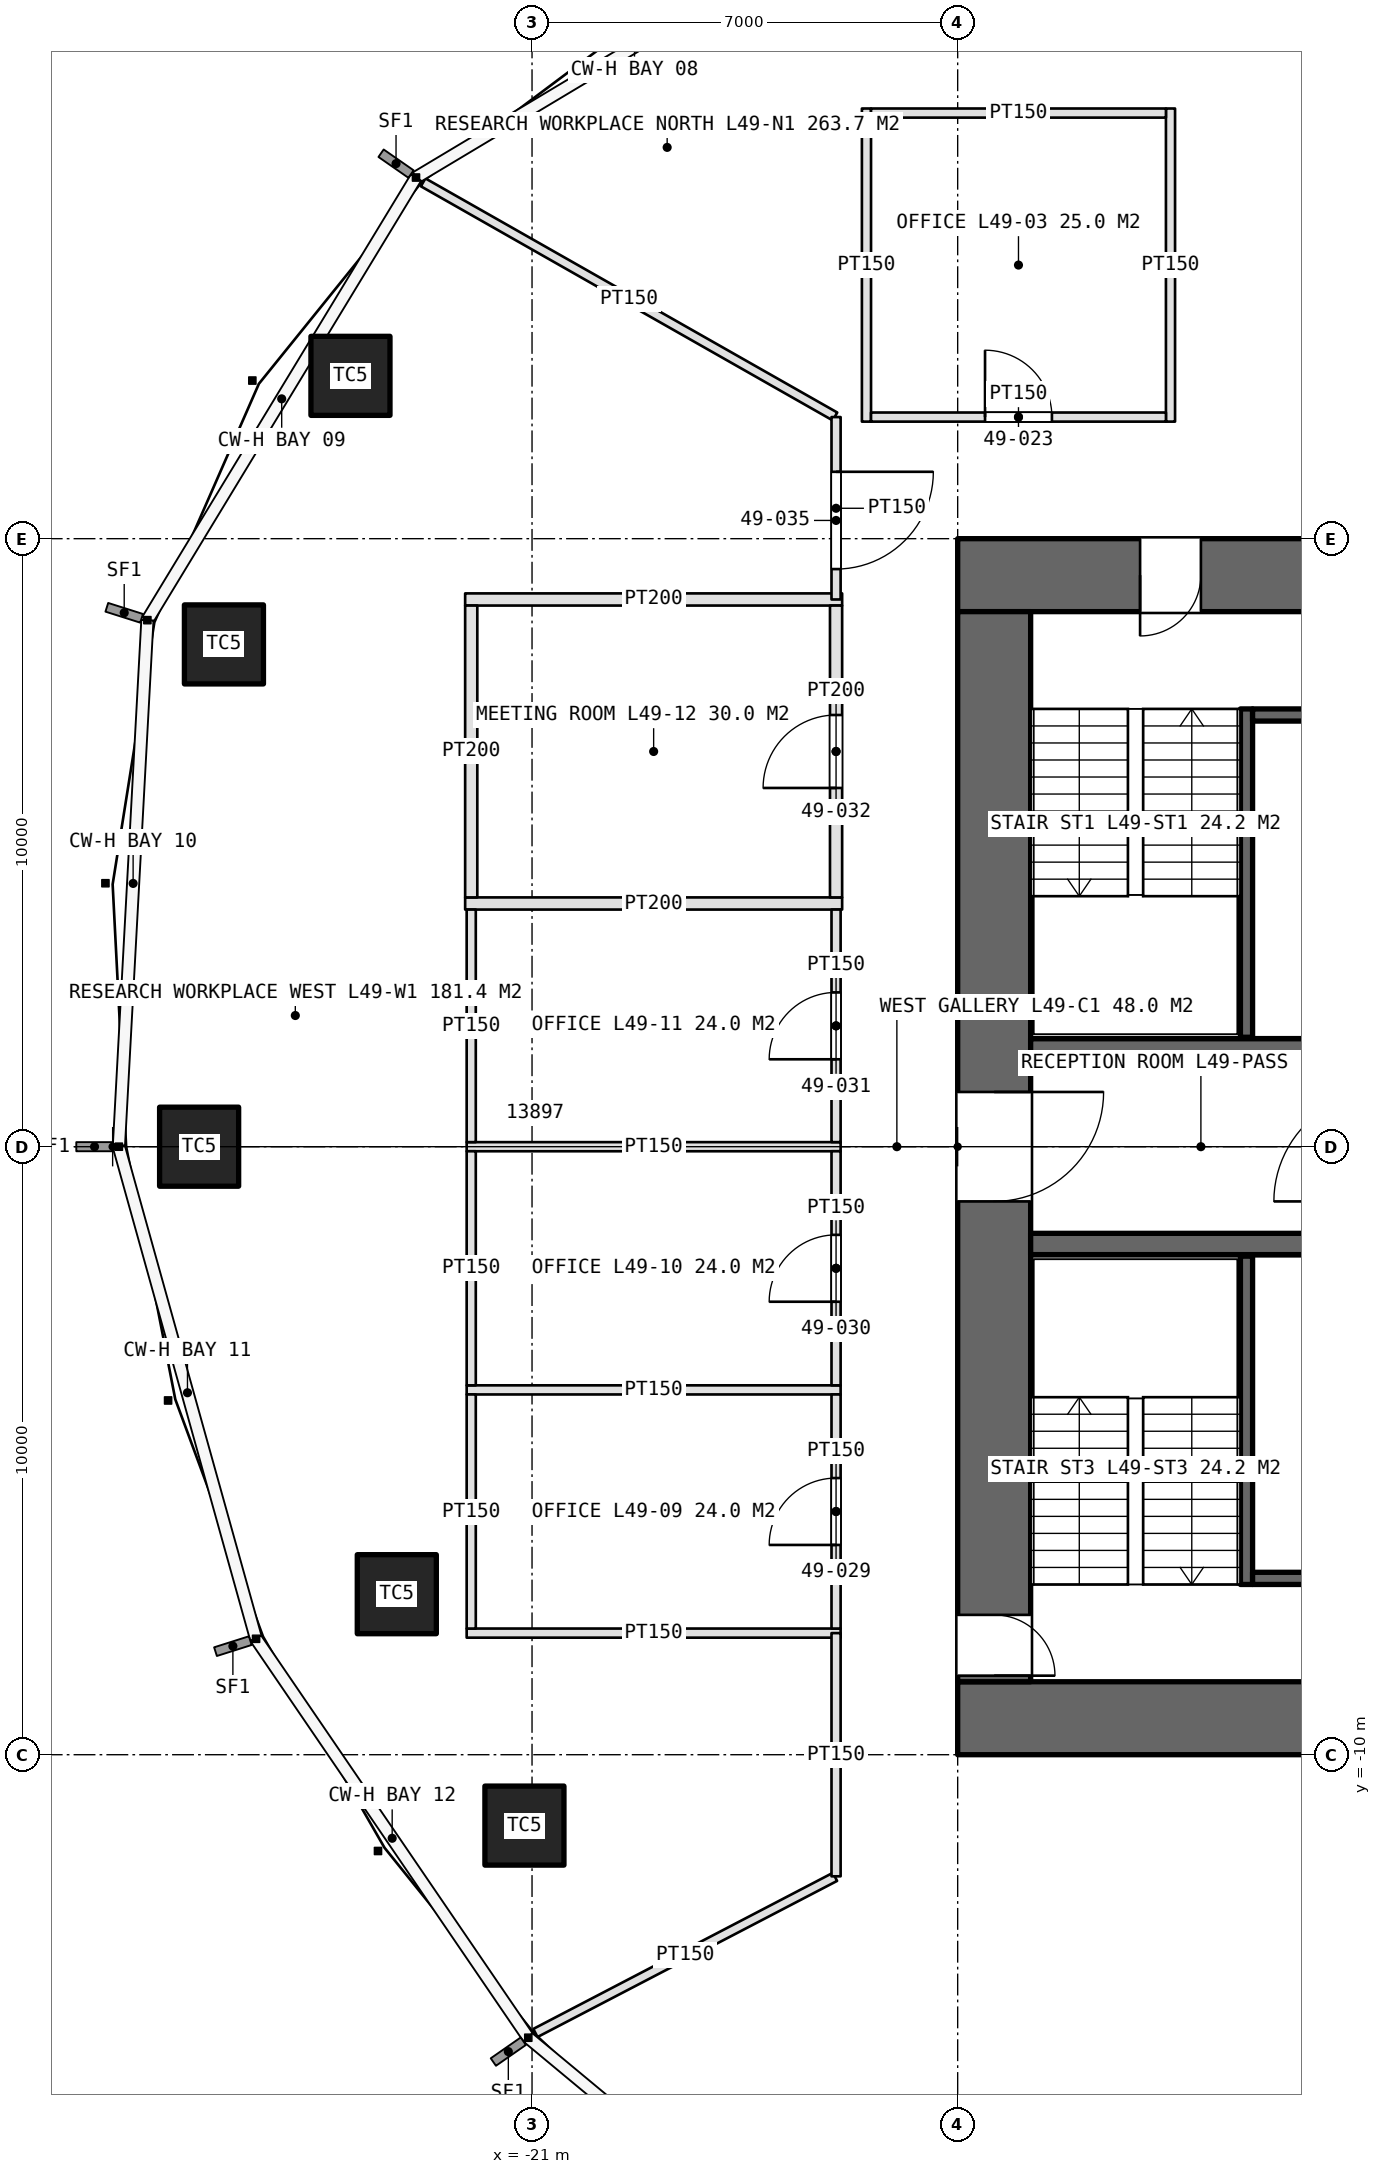
"""IFC4 building model, lengths in metres.
Left out: names, types, materials, properties, quantities, classifications, styles, units other than length and angle.
Written with IfcOpenShell. Run it as: python <this file> out.ifc"""

import sys

from ifc_helpers import new_model, si_unit, direction, frame, frame_2d, origin, origin_2d, place, context, subcontext, project, spatial, rectangle, extrude, element, fill, save


model = new_model("IFC4")
c1 = context("Model", 3, precision=1e-05, world=origin(), true_north=direction((0.0, 1.0)))
c2 = subcontext(c1, "Body", "Model", "MODEL_VIEW")
j1 = project(units=[si_unit("LENGTHUNIT", "METRE"), si_unit("PLANEANGLEUNIT", "RADIAN")], contexts=[c1])
p1 = place(None, origin())
s1 = spatial("IfcSite", under=j1, at=p1, CompositionType="ELEMENT")
p2 = place(p1, origin())
s2 = spatial("IfcBuilding", under=s1, at=p2, CompositionType="ELEMENT")
p3 = place(p2, frame((0.0, 0.0, 224.2)))
s3 = spatial("IfcBuildingStorey", under=s2, at=p3, CompositionType="ELEMENT", Elevation=224.2)
p4 = place(p3, frame((-14.0, -9.4, 0.0), z_axis=(0.0, 0.0, 1.0), x_axis=(1.0, 0.0, 0.0)))
e1 = element("IfcWall", 1, at=p4, inside=s3, PredefinedType="SHEAR", context=c2, shape_type="SweptSolid", body=[
    extrude(rectangle(XDim=28.0, YDim=1.2, at=frame_2d((14.0, 0.0))), origin(), (0.0, 0.0, 1.0), 4.2),
])
p5 = place(p4, frame((22.9, 0.0, 0.0)))
e2 = element("IfcOpeningElement", 2, at=p5, cuts=e1, PredefinedType="OPENING", context=c2, shape_type="SweptSolid", body=[
    extrude(rectangle(XDim=2.2, YDim=2.7, at=frame_2d((1.1, 1.35))), frame((0.0, 0.61, 0.0), z_axis=(0.0, -1.0, 0.0), x_axis=(1.0, 0.0, 0.0)), (0.0, 0.0, 1.0), 1.22),
])
p6 = place(p3, frame((14.0, 9.4, 0.0), z_axis=(0.0, 0.0, 1.0), x_axis=(-1.0, 0.0, 0.0)))
e3 = element("IfcWall", 3, at=p6, inside=s3, PredefinedType="SHEAR", context=c2, shape_type="SweptSolid", body=[
    extrude(rectangle(XDim=28.0, YDim=1.2, at=frame_2d((14.0, 0.0))), origin(), (0.0, 0.0, 1.0), 4.2),
])
p7 = place(p6, frame((24.0, 0.0, 0.0)))
e4 = element("IfcOpeningElement", 4, at=p7, cuts=e3, PredefinedType="OPENING", context=c2, shape_type="SweptSolid", body=[
    extrude(rectangle(XDim=1.0, YDim=2.4, at=frame_2d((0.5, 1.2))), frame((0.0, 0.61, 0.0), z_axis=(0.0, -1.0, 0.0), x_axis=(1.0, 0.0, 0.0)), (0.0, 0.0, 1.0), 1.22),
])
p8 = place(p3, frame((-13.4, 8.8, 0.0), z_axis=(0.0, 0.0, 1.0), x_axis=(0.0, -1.0, 0.0)))
e5 = element("IfcWall", 5, at=p8, inside=s3, PredefinedType="SHEAR", context=c2, shape_type="SweptSolid", body=[
    extrude(rectangle(XDim=17.6, YDim=1.2, at=frame_2d((8.8, 0.0))), origin(), (0.0, 0.0, 1.0), 4.2),
])
p9 = place(p8, frame((7.9, 0.0, 0.0)))
e6 = element("IfcOpeningElement", 6, at=p9, cuts=e5, PredefinedType="OPENING", context=c2, shape_type="SweptSolid", body=[
    extrude(rectangle(XDim=1.8, YDim=2.4, at=frame_2d((0.9, 1.2))), frame((0.0, 0.61, 0.0), z_axis=(0.0, -1.0, 0.0), x_axis=(1.0, 0.0, 0.0)), (0.0, 0.0, 1.0), 1.22),
])
p10 = place(p8, frame((16.5, 0.0, 0.0)))
e7 = element("IfcOpeningElement", 7, at=p10, cuts=e5, PredefinedType="OPENING", context=c2, shape_type="SweptSolid", body=[
    extrude(rectangle(XDim=1.0, YDim=2.4, at=frame_2d((0.5, 1.2))), frame((0.0, 0.61, 0.0), z_axis=(0.0, -1.0, 0.0), x_axis=(1.0, 0.0, 0.0)), (0.0, 0.0, 1.0), 1.22),
])
for number, where, z_axis, x_axis in (
    (8, (-12.8, 1.6, 0.0), (0.0, 0.0, 1.0), (1.0, 0.0, 0.0)),
    (9, (-12.8, -1.6, 0.0), (0.0, 0.0, 1.0), (1.0, 0.0, 0.0)),
):
    element("IfcWall", number, at=place(p3, frame(where, z_axis=z_axis, x_axis=x_axis)), inside=s3, PredefinedType="SHEAR", context=c2, shape_type="SweptSolid", body=[
        extrude(rectangle(XDim=5.6, YDim=0.35, at=frame_2d((2.8, 0.0))), origin(), (0.0, 0.0, 1.0), 4.2),
    ])
for number, where, z_axis, x_axis in (
    (10, (-23.986, 12.678, 0.0), (0.0, 0.0, 1.0), (1.0, 0.0, 0.0)),
    (11, (-26.067, 8.261, 0.0), (0.0, 0.0, 1.0), (1.0, 0.0, 0.0)),
    (12, (-26.475, 0.0, 0.0), (0.0, 0.0, 1.0), (1.0, 0.0, 0.0)),
    (13, (-23.224, -7.36, 0.0), (0.0, 0.0, 1.0), (1.0, 0.0, 0.0)),
    (14, (-21.125, -11.166, 0.0), (0.0, 0.0, 1.0), (1.0, 0.0, 0.0)),
):
    element("IfcColumn", number, at=place(p3, frame(where, z_axis=z_axis, x_axis=x_axis)), inside=s3, PredefinedType="COLUMN", context=c2, shape_type="SweptSolid", body=[
        extrude(rectangle(XDim=1.3, YDim=1.3, at=origin_2d()), origin(), (0.0, 0.0, 1.0), 4.2),
    ])
p11 = place(p3, frame((-9.25, 7.2, 0.0), z_axis=(0.0, 0.0, 1.0), x_axis=(0.0, -1.0, 0.0)))
e15 = element("IfcWall", 15, at=p11, inside=s3, PredefinedType="SOLIDWALL", context=c2, shape_type="SweptSolid", body=[
    extrude(rectangle(XDim=5.4, YDim=0.2, at=frame_2d((2.7, 0.0))), origin(), (0.0, 0.0, 1.0), 4.2),
])
p12 = place(p3, frame((-9.15, 7.1, 0.0), z_axis=(0.0, 0.0, 1.0), x_axis=(1.0, 0.0, 0.0)))
e16 = element("IfcWall", 16, at=p12, inside=s3, PredefinedType="SOLIDWALL", context=c2, shape_type="SweptSolid", body=[
    extrude(rectangle(XDim=1.95, YDim=0.2, at=frame_2d((0.975, 0.0))), origin(), (0.0, 0.0, 1.0), 4.2),
])
p13 = place(p3, frame((-9.25, -7.2, 0.0), z_axis=(0.0, 0.0, 1.0), x_axis=(0.0, 1.0, 0.0)))
e17 = element("IfcWall", 17, at=p13, inside=s3, PredefinedType="SOLIDWALL", context=c2, shape_type="SweptSolid", body=[
    extrude(rectangle(XDim=5.4, YDim=0.2, at=frame_2d((2.7, 0.0))), origin(), (0.0, 0.0, 1.0), 4.2),
])
p14 = place(p3, frame((-9.15, -7.1, 0.0), z_axis=(0.0, 0.0, 1.0), x_axis=(1.0, 0.0, 0.0)))
e18 = element("IfcWall", 18, at=p14, inside=s3, PredefinedType="SOLIDWALL", context=c2, shape_type="SweptSolid", body=[
    extrude(rectangle(XDim=1.95, YDim=0.2, at=frame_2d((0.975, 0.0))), origin(), (0.0, 0.0, 1.0), 4.2),
])
for number, where, z_axis, x_axis in (
    (19, (-15.5, 11.925, 0.0), (0.0, 0.0, 1.0), (0.0, 1.0, 0.0)),
    (20, (-10.5, 11.925, 0.0), (0.0, 0.0, 1.0), (0.0, 1.0, 0.0)),
):
    element("IfcWall", number, at=place(p3, frame(where, z_axis=z_axis, x_axis=x_axis)), inside=s3, PredefinedType="PARTITIONING", context=c2, shape_type="SweptSolid", body=[
        extrude(rectangle(XDim=5.15, YDim=0.15, at=frame_2d((2.575, 0.0))), origin(), (0.0, 0.0, 1.0), 3.0),
    ])
p15 = place(p3, frame((-15.425, 12.0, 0.0), z_axis=(0.0, 0.0, 1.0), x_axis=(1.0, 0.0, 0.0)))
e21 = element("IfcWall", 21, at=p15, inside=s3, PredefinedType="PARTITIONING", context=c2, shape_type="SweptSolid", body=[
    extrude(rectangle(XDim=4.85, YDim=0.15, at=frame_2d((2.425, 0.0))), origin(), (0.0, 0.0, 1.0), 3.0),
])
p16 = place(p15, frame((1.875, 0.0, 0.0)))
e22 = element("IfcOpeningElement", 22, at=p16, cuts=e21, PredefinedType="OPENING", context=c2, shape_type="SweptSolid", body=[
    extrude(rectangle(XDim=1.1, YDim=2.3, at=frame_2d((0.55, 1.15))), frame((0.0, 0.085, 0.0), z_axis=(0.0, -1.0, 0.0), x_axis=(1.0, 0.0, 0.0)), (0.0, 0.0, 1.0), 0.17),
])
p17 = place(p3, frame((-15.425, 17.0, 0.0), z_axis=(0.0, 0.0, 1.0), x_axis=(1.0, 0.0, 0.0)))
e23 = element("IfcWall", 23, at=p17, inside=s3, PredefinedType="PARTITIONING", context=c2, shape_type="SweptSolid", body=[
    extrude(rectangle(XDim=4.85, YDim=0.15, at=frame_2d((2.425, 0.0))), origin(), (0.0, 0.0, 1.0), 3.0),
])
for number, where, z_axis, x_axis in (
    (24, (-15.925, -8.0, 0.0), (0.0, 0.0, 1.0), (-1.0, 0.0, 0.0)),
    (25, (-15.925, -4.0, 0.0), (0.0, 0.0, 1.0), (-1.0, 0.0, 0.0)),
    (26, (-15.925, 0.0, 0.0), (0.0, 0.0, 1.0), (-1.0, 0.0, 0.0)),
):
    element("IfcWall", number, at=place(p3, frame(where, z_axis=z_axis, x_axis=x_axis)), inside=s3, PredefinedType="PARTITIONING", context=c2, shape_type="SweptSolid", body=[
        extrude(rectangle(XDim=6.15, YDim=0.15, at=frame_2d((3.075, 0.0))), origin(), (0.0, 0.0, 1.0), 3.0),
    ])
for number, where, z_axis, x_axis in (
    (27, (-15.9, 4.0, 0.0), (0.0, 0.0, 1.0), (-1.0, 0.0, 0.0)),
    (28, (-15.9, 9.0, 0.0), (0.0, 0.0, 1.0), (-1.0, 0.0, 0.0)),
):
    element("IfcWall", number, at=place(p3, frame(where, z_axis=z_axis, x_axis=x_axis)), inside=s3, PredefinedType="PARTITIONING", context=c2, shape_type="SweptSolid", body=[
        extrude(rectangle(XDim=6.2, YDim=0.2, at=frame_2d((3.1, 0.0))), origin(), (0.0, 0.0, 1.0), 3.0),
    ])
p18 = place(p3, frame((-16.0, -7.925, 0.0), z_axis=(0.0, 0.0, 1.0), x_axis=(0.0, 1.0, 0.0)))
e29 = element("IfcWall", 29, at=p18, inside=s3, PredefinedType="PARTITIONING", context=c2, shape_type="SweptSolid", body=[
    extrude(rectangle(XDim=3.85, YDim=0.15, at=frame_2d((1.925, 0.0))), origin(), (0.0, 0.0, 1.0), 3.0),
])
p19 = place(p18, frame((1.375, 0.0, 0.0)))
e30 = element("IfcOpeningElement", 30, at=p19, cuts=e29, PredefinedType="OPENING", context=c2, shape_type="SweptSolid", body=[
    extrude(rectangle(XDim=1.1, YDim=2.3, at=frame_2d((0.55, 1.15))), frame((0.0, 0.085, 0.0), z_axis=(0.0, -1.0, 0.0), x_axis=(1.0, 0.0, 0.0)), (0.0, 0.0, 1.0), 0.17),
])
p20 = place(p3, frame((-22.0, -7.925, 0.0), z_axis=(0.0, 0.0, 1.0), x_axis=(0.0, 1.0, 0.0)))
e31 = element("IfcWall", 31, at=p20, inside=s3, PredefinedType="PARTITIONING", context=c2, shape_type="SweptSolid", body=[
    extrude(rectangle(XDim=3.85, YDim=0.15, at=frame_2d((1.925, 0.0))), origin(), (0.0, 0.0, 1.0), 3.0),
])
p21 = place(p3, frame((-16.0, -3.925, 0.0), z_axis=(0.0, 0.0, 1.0), x_axis=(0.0, 1.0, 0.0)))
e32 = element("IfcWall", 32, at=p21, inside=s3, PredefinedType="PARTITIONING", context=c2, shape_type="SweptSolid", body=[
    extrude(rectangle(XDim=3.85, YDim=0.15, at=frame_2d((1.925, 0.0))), origin(), (0.0, 0.0, 1.0), 3.0),
])
p22 = place(p21, frame((1.375, 0.0, 0.0)))
e33 = element("IfcOpeningElement", 33, at=p22, cuts=e32, PredefinedType="OPENING", context=c2, shape_type="SweptSolid", body=[
    extrude(rectangle(XDim=1.1, YDim=2.3, at=frame_2d((0.55, 1.15))), frame((0.0, 0.085, 0.0), z_axis=(0.0, -1.0, 0.0), x_axis=(1.0, 0.0, 0.0)), (0.0, 0.0, 1.0), 0.17),
])
p23 = place(p3, frame((-22.0, -3.925, 0.0), z_axis=(0.0, 0.0, 1.0), x_axis=(0.0, 1.0, 0.0)))
e34 = element("IfcWall", 34, at=p23, inside=s3, PredefinedType="PARTITIONING", context=c2, shape_type="SweptSolid", body=[
    extrude(rectangle(XDim=3.85, YDim=0.15, at=frame_2d((1.925, 0.0))), origin(), (0.0, 0.0, 1.0), 3.0),
])
p24 = place(p3, frame((-16.0, 0.075, 0.0), z_axis=(0.0, 0.0, 1.0), x_axis=(0.0, 1.0, 0.0)))
e35 = element("IfcWall", 35, at=p24, inside=s3, PredefinedType="PARTITIONING", context=c2, shape_type="SweptSolid", body=[
    extrude(rectangle(XDim=3.825, YDim=0.15, at=frame_2d((1.913, 0.0))), origin(), (0.0, 0.0, 1.0), 3.0),
])
p25 = place(p24, frame((1.363, 0.0, 0.0)))
e36 = element("IfcOpeningElement", 36, at=p25, cuts=e35, PredefinedType="OPENING", context=c2, shape_type="SweptSolid", body=[
    extrude(rectangle(XDim=1.1, YDim=2.3, at=frame_2d((0.55, 1.15))), frame((0.0, 0.085, 0.0), z_axis=(0.0, -1.0, 0.0), x_axis=(1.0, 0.0, 0.0)), (0.0, 0.0, 1.0), 0.17),
])
p26 = place(p3, frame((-22.0, 0.075, 0.0), z_axis=(0.0, 0.0, 1.0), x_axis=(0.0, 1.0, 0.0)))
e37 = element("IfcWall", 37, at=p26, inside=s3, PredefinedType="PARTITIONING", context=c2, shape_type="SweptSolid", body=[
    extrude(rectangle(XDim=3.825, YDim=0.15, at=frame_2d((1.913, 0.0))), origin(), (0.0, 0.0, 1.0), 3.0),
])
p27 = place(p3, frame((-16.0, 4.1, 0.0), z_axis=(0.0, 0.0, 1.0), x_axis=(0.0, 1.0, 0.0)))
e38 = element("IfcWall", 38, at=p27, inside=s3, PredefinedType="PARTITIONING", context=c2, shape_type="SweptSolid", body=[
    extrude(rectangle(XDim=4.8, YDim=0.2, at=frame_2d((2.4, 0.0))), origin(), (0.0, 0.0, 1.0), 3.0),
])
p28 = place(p27, frame((1.8, 0.0, 0.0)))
e39 = element("IfcOpeningElement", 39, at=p28, cuts=e38, PredefinedType="OPENING", context=c2, shape_type="SweptSolid", body=[
    extrude(rectangle(XDim=1.2, YDim=2.4, at=frame_2d((0.6, 1.2))), frame((0.0, 0.11, 0.0), z_axis=(0.0, -1.0, 0.0), x_axis=(1.0, 0.0, 0.0)), (0.0, 0.0, 1.0), 0.22),
])
p29 = place(p3, frame((-22.0, 4.1, 0.0), z_axis=(0.0, 0.0, 1.0), x_axis=(0.0, 1.0, 0.0)))
e40 = element("IfcWall", 40, at=p29, inside=s3, PredefinedType="PARTITIONING", context=c2, shape_type="SweptSolid", body=[
    extrude(rectangle(XDim=4.8, YDim=0.2, at=frame_2d((2.4, 0.0))), origin(), (0.0, 0.0, 1.0), 3.0),
])
p30 = place(p3, frame((-16.018, -12.009, 0.0), z_axis=(0.0, 0.0, 1.0), x_axis=(-0.886831549241, -0.462092851351, 0.0)))
e41 = element("IfcWall", 41, at=p30, inside=s3, PredefinedType="PARTITIONING", context=c2, shape_type="SweptSolid", body=[
    extrude(rectangle(XDim=5.555, YDim=0.15, at=frame_2d((2.778, 0.0))), origin(), (0.0, 0.0, 1.0), 3.0),
])
p31 = place(p3, frame((-16.017, 12.01, 0.0), z_axis=(0.0, 0.0, 1.0), x_axis=(-0.869357432803, 0.494183826151, 0.0)))
e42 = element("IfcWall", 42, at=p31, inside=s3, PredefinedType="PARTITIONING", context=c2, shape_type="SweptSolid", body=[
    extrude(rectangle(XDim=7.791, YDim=0.15, at=frame_2d((3.896, 0.0))), origin(), (0.0, 0.0, 1.0), 3.0),
])
p32 = place(p3, frame((-16.0, -8.0, 0.0), z_axis=(0.0, 0.0, 1.0), x_axis=(0.0, -1.0, 0.0)))
e43 = element("IfcWall", 43, at=p32, inside=s3, PredefinedType="PARTITIONING", context=c2, shape_type="SweptSolid", body=[
    extrude(rectangle(XDim=4.0, YDim=0.15, at=frame_2d((2.0, 0.0))), origin(), (0.0, 0.0, 1.0), 3.0),
])
p33 = place(p3, frame((-16.0, 12.0, 0.0), z_axis=(0.0, 0.0, 1.0), x_axis=(0.0, -1.0, 0.0)))
e44 = element("IfcWall", 44, at=p33, inside=s3, PredefinedType="PARTITIONING", context=c2, shape_type="SweptSolid", body=[
    extrude(rectangle(XDim=3.0, YDim=0.15, at=frame_2d((1.5, 0.0))), origin(), (0.0, 0.0, 1.0), 3.0),
])
p34 = place(p33, frame((0.9, 0.0, 0.0)))
e45 = element("IfcOpeningElement", 45, at=p34, cuts=e44, PredefinedType="OPENING", context=c2, shape_type="SweptSolid", body=[
    extrude(rectangle(XDim=1.6, YDim=2.4, at=frame_2d((0.8, 1.2))), frame((0.0, 0.085, 0.0), z_axis=(0.0, -1.0, 0.0), x_axis=(1.0, 0.0, 0.0)), (0.0, 0.0, 1.0), 0.17),
])
p35 = place(p9, origin())
e46 = element("IfcDoor", 46, at=p35, inside=s3, OperationType="DOUBLE_DOOR_SINGLE_SWING", PredefinedType="DOOR", context=c2, shape_type="SweptSolid", body=[
    extrude(rectangle(XDim=1.8, YDim=2.4, at=frame_2d((0.9, 1.2))), frame((0.0, 0.025, 0.0), z_axis=(0.0, -1.0, 0.0), x_axis=(1.0, 0.0, 0.0)), (0.0, 0.0, 1.0), 0.05),
])
fill(e6, e46)
p36 = place(p7, origin())
e47 = element("IfcDoor", 47, at=p36, inside=s3, OperationType="SINGLE_SWING_RIGHT", PredefinedType="DOOR", context=c2, shape_type="SweptSolid", body=[
    extrude(rectangle(XDim=1.0, YDim=2.4, at=frame_2d((0.5, 1.2))), frame((0.0, 0.025, 0.0), z_axis=(0.0, -1.0, 0.0), x_axis=(1.0, 0.0, 0.0)), (0.0, 0.0, 1.0), 0.05),
])
fill(e4, e47)
p37 = place(p10, origin())
e48 = element("IfcDoor", 48, at=p37, inside=s3, OperationType="SINGLE_SWING_RIGHT", PredefinedType="DOOR", context=c2, shape_type="SweptSolid", body=[
    extrude(rectangle(XDim=1.0, YDim=2.4, at=frame_2d((0.5, 1.2))), frame((0.0, 0.025, 0.0), z_axis=(0.0, -1.0, 0.0), x_axis=(1.0, 0.0, 0.0)), (0.0, 0.0, 1.0), 0.05),
])
fill(e7, e48)
p38 = place(p16, origin())
e49 = element("IfcDoor", 49, at=p38, inside=s3, OperationType="SINGLE_SWING_LEFT", PredefinedType="DOOR", context=c2, shape_type="SweptSolid", body=[
    extrude(rectangle(XDim=1.1, YDim=2.3, at=frame_2d((0.55, 1.15))), frame((0.0, 0.025, 0.0), z_axis=(0.0, -1.0, 0.0), x_axis=(1.0, 0.0, 0.0)), (0.0, 0.0, 1.0), 0.05),
])
fill(e22, e49)
p39 = place(p19, origin())
e50 = element("IfcDoor", 50, at=p39, inside=s3, OperationType="SINGLE_SWING_LEFT", PredefinedType="DOOR", context=c2, shape_type="SweptSolid", body=[
    extrude(rectangle(XDim=1.1, YDim=2.3, at=frame_2d((0.55, 1.15))), frame((0.0, 0.025, 0.0), z_axis=(0.0, -1.0, 0.0), x_axis=(1.0, 0.0, 0.0)), (0.0, 0.0, 1.0), 0.05),
])
fill(e30, e50)
p40 = place(p22, origin())
e51 = element("IfcDoor", 51, at=p40, inside=s3, OperationType="SINGLE_SWING_LEFT", PredefinedType="DOOR", context=c2, shape_type="SweptSolid", body=[
    extrude(rectangle(XDim=1.1, YDim=2.3, at=frame_2d((0.55, 1.15))), frame((0.0, 0.025, 0.0), z_axis=(0.0, -1.0, 0.0), x_axis=(1.0, 0.0, 0.0)), (0.0, 0.0, 1.0), 0.05),
])
fill(e33, e51)
p41 = place(p25, origin())
e52 = element("IfcDoor", 52, at=p41, inside=s3, OperationType="SINGLE_SWING_LEFT", PredefinedType="DOOR", context=c2, shape_type="SweptSolid", body=[
    extrude(rectangle(XDim=1.1, YDim=2.3, at=frame_2d((0.55, 1.15))), frame((0.0, 0.025, 0.0), z_axis=(0.0, -1.0, 0.0), x_axis=(1.0, 0.0, 0.0)), (0.0, 0.0, 1.0), 0.05),
])
fill(e36, e52)
p42 = place(p28, origin())
e53 = element("IfcDoor", 53, at=p42, inside=s3, OperationType="SINGLE_SWING_LEFT", PredefinedType="DOOR", context=c2, shape_type="SweptSolid", body=[
    extrude(rectangle(XDim=1.2, YDim=2.4, at=frame_2d((0.6, 1.2))), frame((0.0, 0.025, 0.0), z_axis=(0.0, -1.0, 0.0), x_axis=(1.0, 0.0, 0.0)), (0.0, 0.0, 1.0), 0.05),
])
fill(e39, e53)
p43 = place(p34, origin())
e54 = element("IfcDoor", 54, at=p43, inside=s3, OperationType="DOUBLE_DOOR_SINGLE_SWING", PredefinedType="DOOR", context=c2, shape_type="SweptSolid", body=[
    extrude(rectangle(XDim=1.6, YDim=2.4, at=frame_2d((0.8, 1.2))), frame((0.0, 0.025, 0.0), z_axis=(0.0, -1.0, 0.0), x_axis=(1.0, 0.0, 0.0)), (0.0, 0.0, 1.0), 0.05),
])
fill(e45, e54)
save(model, sys.argv[1])
